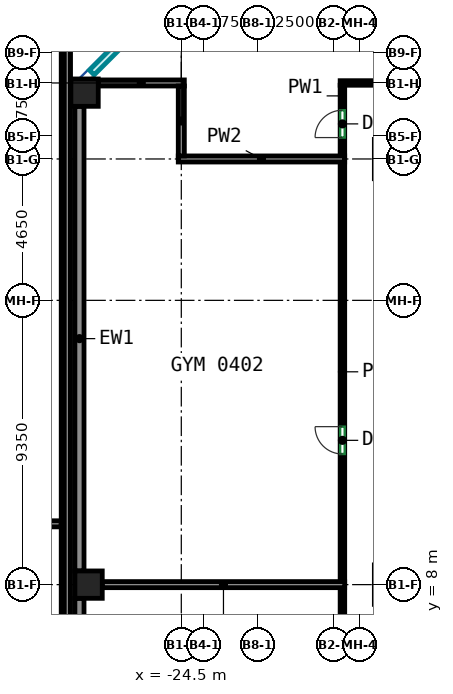
"""IFC4 building model, lengths in metres.
Left out: names, types, materials, properties, quantities, classifications, styles, units other than length and angle.
Written with IfcOpenShell. Run it as: python <this file> out.ifc"""

import sys

from ifc_helpers import new_model, si_unit, direction, frame, frame_2d, origin, origin_2d, place, context, subcontext, project, spatial, rectangle, extrude, source, transform, mapped, element, fill, save


model = new_model("IFC4")
c1 = context("Model", 3, precision=1e-05, world=origin(), true_north=direction((0.0, 1.0)))
c2 = subcontext(c1, "Body", "Model", "MODEL_VIEW")
j1 = project(units=[si_unit("LENGTHUNIT", "METRE"), si_unit("PLANEANGLEUNIT", "RADIAN")], contexts=[c1])
p1 = place(None, origin())
s1 = spatial("IfcSite", under=j1, at=p1, CompositionType="ELEMENT")
p2 = place(p1, origin())
s2 = spatial("IfcBuilding", under=s1, at=p2, CompositionType="ELEMENT")
p3 = place(p2, frame((0.0, 0.0, 22.5)))
s3 = spatial("IfcBuildingStorey", under=s2, at=p3, CompositionType="ELEMENT", Elevation=22.5)
m1 = source(origin(), c2, "Body", "SweptSolid", [
    extrude(rectangle(XDim=0.9, YDim=0.9, at=origin_2d()), origin(), (0.0, 0.0, 1.0), 4.22),
])
for number, where, z_axis, x_axis in (
    (1, (-27.682, 24.182, 0.0), (0.0, 0.0, 1.0), (1.0, 0.0, 0.0)),
    (2, (-27.55, 8.0, 0.0), (0.0, 0.0, 1.0), (1.0, 0.0, 0.0)),
):
    element("IfcColumn", number, at=place(p3, frame(where, z_axis=z_axis, x_axis=x_axis)), inside=s3, PredefinedType="COLUMN", context=c2, shape_type="MappedRepresentation", body=[
        mapped(m1, transform((0.0, 0.0, 0.0))),
    ])
m2 = source(origin(), c2, "Body", "SweptSolid", [
    extrude(rectangle(XDim=15.282, YDim=0.3, at=frame_2d((7.641, 0.0))), origin(), (0.0, 0.0, 1.0), 4.22),
])
p4 = place(p3, frame((-27.85, 23.732, 0.0), z_axis=(0.0, 0.0, 1.0), x_axis=(0.0, -1.0, 0.0)))
e3 = element("IfcWall", 3, at=p4, inside=s3, PredefinedType="SOLIDWALL", context=c2, shape_type="MappedRepresentation", body=[
    mapped(m2, transform((0.0, 0.0, 0.0))),
])
m3 = source(origin(), c2, "Body", "SweptSolid", [
    extrude(rectangle(XDim=8.1, YDim=0.3, at=frame_2d((4.05, 0.0))), origin(), (0.0, 0.0, 1.0), 4.22),
])
p5 = place(p3, frame((-27.85, 7.55, 0.0), z_axis=(0.0, 0.0, 1.0), x_axis=(0.0, -1.0, 0.0)))
e4 = element("IfcWall", 4, at=p5, inside=s3, PredefinedType="SOLIDWALL", context=c2, shape_type="MappedRepresentation", body=[
    mapped(m3, transform((0.0, 0.0, 0.0))),
])
m4 = source(origin(), c2, "Body", "SweptSolid", [
    extrude(rectangle(XDim=56.3, YDim=0.3, at=frame_2d((28.15, 0.0))), origin(), (0.0, 0.0, 1.0), 4.22),
])
p6 = place(p3, frame((-28.3, 28.15, 0.0), z_axis=(0.0, 0.0, 1.0), x_axis=(0.0, -1.0, 0.0)))
e5 = element("IfcWall", 5, at=p6, inside=s3, PredefinedType="SOLIDWALL", context=c2, shape_type="MappedRepresentation", body=[
    mapped(m4, transform((0.0, 0.0, 0.0))),
])
m5 = source(origin(), c2, "Body", "SweptSolid", [
    extrude(rectangle(XDim=56.3, YDim=0.2, at=frame_2d((28.15, 0.0))), origin(), (0.0, 0.0, 1.0), 1.1),
])
p7 = place(p3, frame((-28.25, 28.15, 4.5), z_axis=(0.0, 0.0, 1.0), x_axis=(0.0, -1.0, 0.0)))
e6 = element("IfcWall", 6, at=p7, inside=s3, PredefinedType="PARAPET", context=c2, shape_type="MappedRepresentation", body=[
    mapped(m5, transform((0.0, 0.0, 0.0))),
])
p8 = place(p3, frame((-19.2, 3.575, 0.0), z_axis=(0.0, 0.0, 1.0), x_axis=(0.0, 1.0, 0.0)))
e7 = element("IfcWall", 7, at=p8, inside=s3, PredefinedType="PARTITIONING", context=c2, shape_type="SweptSolid", body=[
    extrude(rectangle(XDim=4.335, YDim=0.15, at=frame_2d((2.167, 0.0))), origin(), (0.0, 0.0, 1.0), 4.22),
])
p9 = place(p3, frame((-19.2, 22.09, 0.0), z_axis=(0.0, 0.0, 1.0), x_axis=(0.0, 1.0, 0.0)))
e8 = element("IfcWall", 8, at=p9, inside=s3, PredefinedType="PARTITIONING", context=c2, shape_type="SweptSolid", body=[
    extrude(rectangle(XDim=2.335, YDim=0.15, at=frame_2d((1.167, 0.0))), origin(), (0.0, 0.0, 1.0), 4.22),
])
p10 = place(p9, frame((0.614, 0.0, 0.0)))
e9 = element("IfcOpeningElement", 9, at=p10, cuts=e8, PredefinedType="OPENING", context=c2, shape_type="SweptSolid", body=[
    extrude(rectangle(XDim=0.9, YDim=2.1, at=frame_2d((0.45, 1.05))), frame((0.0, 0.085, 0.0), z_axis=(0.0, -1.0, 0.0), x_axis=(1.0, 0.0, 0.0)), (0.0, 0.0, 1.0), 0.17),
])
p11 = place(p3, frame((-19.275, 24.5, 0.0), z_axis=(0.0, 0.0, 1.0), x_axis=(1.0, 0.0, 0.0)))
e10 = element("IfcWall", 10, at=p11, inside=s3, PredefinedType="PARTITIONING", context=c2, shape_type="SweptSolid", body=[
    extrude(rectangle(XDim=40.35, YDim=0.15, at=frame_2d((20.175, 0.0))), origin(), (0.0, 0.0, 1.0), 3.57),
])
p12 = place(p11, frame((10.378, 0.0, 0.0)))
e11 = element("IfcOpeningElement", 11, at=p12, cuts=e10, PredefinedType="OPENING", context=c2, shape_type="SweptSolid", body=[
    extrude(rectangle(XDim=0.9, YDim=2.1, at=frame_2d((0.45, 1.05))), frame((0.0, 0.085, 0.0), z_axis=(0.0, -1.0, 0.0), x_axis=(1.0, 0.0, 0.0)), (0.0, 0.0, 1.0), 0.17),
])
p13 = place(p11, frame((23.292, 0.0, 0.0)))
e12 = element("IfcOpeningElement", 12, at=p13, cuts=e10, PredefinedType="OPENING", context=c2, shape_type="SweptSolid", body=[
    extrude(rectangle(XDim=1.0, YDim=2.1, at=frame_2d((0.5, 1.05))), frame((0.0, 0.085, 0.0), z_axis=(0.0, -1.0, 0.0), x_axis=(1.0, 0.0, 0.0)), (0.0, 0.0, 1.0), 0.17),
])
p14 = place(p3, frame((-19.2, 8.09, 0.0), z_axis=(0.0, 0.0, 1.0), x_axis=(0.0, 1.0, 0.0)))
e13 = element("IfcWall", 13, at=p14, inside=s3, PredefinedType="PARTITIONING", context=c2, shape_type="SweptSolid", body=[
    extrude(rectangle(XDim=13.82, YDim=0.15, at=frame_2d((6.91, 0.0))), origin(), (0.0, 0.0, 1.0), 4.22),
])
p15 = place(p14, frame((4.206, 0.0, 0.0)))
e14 = element("IfcOpeningElement", 14, at=p15, cuts=e13, PredefinedType="OPENING", context=c2, shape_type="SweptSolid", body=[
    extrude(rectangle(XDim=0.9, YDim=2.1, at=frame_2d((0.45, 1.05))), frame((0.0, 0.085, 0.0), z_axis=(0.0, -1.0, 0.0), x_axis=(1.0, 0.0, 0.0)), (0.0, 0.0, 1.0), 0.17),
])
p16 = place(p3, frame((-27.1, 8.0, 0.0), z_axis=(0.0, 0.0, 1.0), x_axis=(1.0, 0.0, 0.0)))
e15 = element("IfcWall", 15, at=p16, inside=s3, PredefinedType="PARTITIONING", context=c2, shape_type="SweptSolid", body=[
    extrude(rectangle(XDim=7.974, YDim=0.2, at=frame_2d((3.987, 0.0))), origin(), (0.0, 0.0, 1.0), 3.57),
])
p17 = place(p3, frame((-27.232, 24.5, 0.0), z_axis=(0.0, 0.0, 1.0), x_axis=(1.0, 0.0, 0.0)))
e16 = element("IfcWall", 16, at=p17, inside=s3, PredefinedType="PARTITIONING", context=c2, shape_type="SweptSolid", body=[
    extrude(rectangle(XDim=2.832, YDim=0.2, at=frame_2d((1.416, 0.0))), origin(), (0.0, 0.0, 1.0), 3.57),
])
p18 = place(p3, frame((-24.6, 22.0, 0.0), z_axis=(0.0, 0.0, 1.0), x_axis=(1.0, 0.0, 0.0)))
e17 = element("IfcWall", 17, at=p18, inside=s3, PredefinedType="PARTITIONING", context=c2, shape_type="SweptSolid", body=[
    extrude(rectangle(XDim=5.474, YDim=0.2, at=frame_2d((2.737, 0.0))), origin(), (0.0, 0.0, 1.0), 4.22),
])
p19 = place(p3, frame((-24.5, 24.4, 0.0), z_axis=(0.0, 0.0, 1.0), x_axis=(0.0, -1.0, 0.0)))
e18 = element("IfcWall", 18, at=p19, inside=s3, PredefinedType="PARTITIONING", context=c2, shape_type="SweptSolid", body=[
    extrude(rectangle(XDim=2.3, YDim=0.2, at=frame_2d((1.15, 0.0))), origin(), (0.0, 0.0, 1.0), 3.57),
])
m6 = source(origin(), c2, "Body", "SweptSolid", [
    extrude(rectangle(XDim=10.1, YDim=0.2, at=frame_2d((5.05, 0.0))), origin(), (0.0, 0.0, 1.0), 3.42),
])
p20 = place(p3, frame((-38.55, 10.0, 0.0), z_axis=(0.0, 0.0, 1.0), x_axis=(1.0, 0.0, 0.0)))
e19 = element("IfcWall", 19, at=p20, inside=s3, PredefinedType="PARTITIONING", context=c2, shape_type="MappedRepresentation", body=[
    mapped(m6, transform((0.0, 0.0, 0.0))),
])
p21 = place(p15, origin())
e20 = element("IfcDoor", 20, at=p21, inside=s3, OperationType="SINGLE_SWING_RIGHT", PredefinedType="DOOR", context=c2, shape_type="SweptSolid", body=[
    extrude(rectangle(XDim=0.9, YDim=2.1, at=frame_2d((0.45, 1.05))), frame((0.0, 0.025, 0.0), z_axis=(0.0, -1.0, 0.0), x_axis=(1.0, 0.0, 0.0)), (0.0, 0.0, 1.0), 0.05),
])
fill(e14, e20)
p22 = place(p10, origin())
e21 = element("IfcDoor", 21, at=p22, inside=s3, OperationType="SINGLE_SWING_LEFT", PredefinedType="DOOR", context=c2, shape_type="SweptSolid", body=[
    extrude(rectangle(XDim=0.9, YDim=2.1, at=frame_2d((0.45, 1.05))), frame((0.0, 0.025, 0.0), z_axis=(0.0, -1.0, 0.0), x_axis=(1.0, 0.0, 0.0)), (0.0, 0.0, 1.0), 0.05),
])
fill(e9, e21)
save(model, sys.argv[1])
